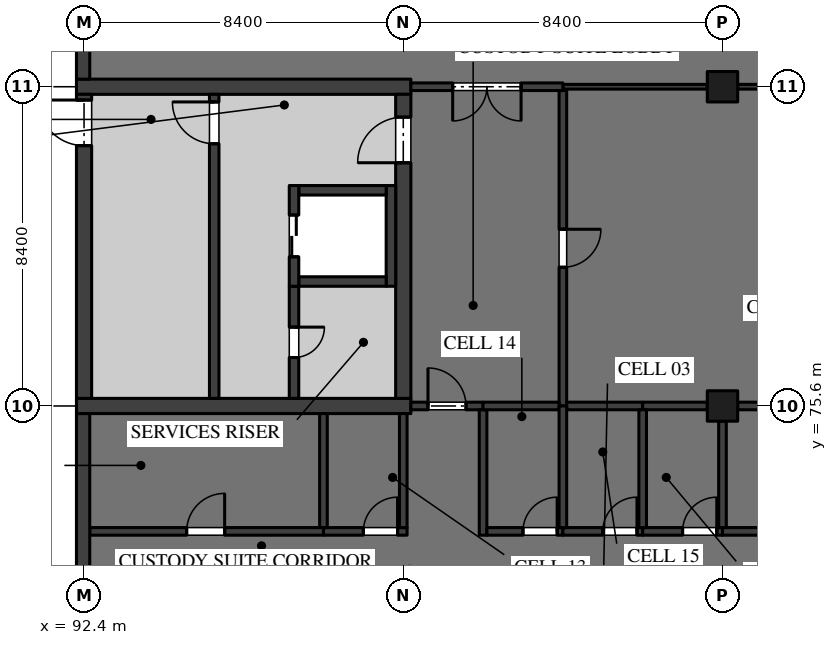
"""IFC4 building model, lengths in metres.
Left out: names, types, materials, properties, quantities, classifications, styles, units other than length and angle.
Written with IfcOpenShell. Run it as: python <this file> out.ifc"""

import sys

from ifc_helpers import new_model, si_unit, direction, frame, frame_2d, origin, origin_2d, place, context, subcontext, project, spatial, rectangle, extrude, element, fill, save


model = new_model("IFC4")
c1 = context("Model", 3, precision=1e-05, world=origin(), true_north=direction((0.0, 1.0)))
c2 = subcontext(c1, "Body", "Model", "MODEL_VIEW")
j1 = project(units=[si_unit("LENGTHUNIT", "METRE"), si_unit("PLANEANGLEUNIT", "RADIAN")], contexts=[c1])
p1 = place(None, origin())
s1 = spatial("IfcSite", under=j1, at=p1, CompositionType="ELEMENT")
p2 = place(p1, origin())
s2 = spatial("IfcBuilding", under=s1, at=p2, CompositionType="ELEMENT")
p3 = place(p2, origin())
s3 = spatial("IfcBuildingStorey", under=s2, at=p3, CompositionType="ELEMENT", Elevation=0.0)
for number, where, z_axis, x_axis in (
    (1, (109.2, 75.6, 0.0), (0.0, 0.0, 1.0), (1.0, 0.0, 0.0)),
    (2, (109.2, 84.0, 0.0), (0.0, 0.0, 1.0), (1.0, 0.0, 0.0)),
):
    element("IfcColumn", number, at=place(p3, frame(where, z_axis=z_axis, x_axis=x_axis)), inside=s3, PredefinedType="COLUMN", context=c2, shape_type="SweptSolid", body=[
        extrude(rectangle(XDim=0.8, YDim=0.8, at=origin_2d()), origin(), (0.0, 0.0, 1.0), 5.05),
    ])
for number, where, z_axis, x_axis in (
    (3, (92.2, 75.6, 0.0), (0.0, 0.0, 1.0), (1.0, 0.0, 0.0)),
    (4, (92.2, 84.0, 0.0), (0.0, 0.0, 1.0), (1.0, 0.0, 0.0)),
):
    element("IfcWall", number, at=place(p3, frame(where, z_axis=z_axis, x_axis=x_axis)), inside=s3, PredefinedType="SHEAR", context=c2, shape_type="SweptSolid", body=[
        extrude(rectangle(XDim=8.8, YDim=0.4, at=frame_2d((4.4, 0.0))), origin(), (0.0, 0.0, 1.0), 5.05),
    ])
p4 = place(p3, frame((92.4, 75.8, 0.0), z_axis=(0.0, 0.0, 1.0), x_axis=(0.0, 1.0, 0.0)))
e5 = element("IfcWall", 5, at=p4, inside=s3, PredefinedType="SHEAR", context=c2, shape_type="SweptSolid", body=[
    extrude(rectangle(XDim=8.0, YDim=0.4, at=frame_2d((4.0, 0.0))), origin(), (0.0, 0.0, 1.0), 5.05),
])
p5 = place(p4, frame((6.65, 0.0, 0.0)))
e6 = element("IfcOpeningElement", 6, at=p5, cuts=e5, PredefinedType="OPENING", context=c2, shape_type="SweptSolid", body=[
    extrude(rectangle(XDim=1.2, YDim=2.1, at=frame_2d((0.6, 1.05))), frame((0.0, 0.21, 0.0), z_axis=(0.0, -1.0, 0.0), x_axis=(1.0, 0.0, 0.0)), (0.0, 0.0, 1.0), 0.42),
])
p6 = place(p3, frame((100.8, 75.8, 0.0), z_axis=(0.0, 0.0, 1.0), x_axis=(0.0, 1.0, 0.0)))
e7 = element("IfcWall", 7, at=p6, inside=s3, PredefinedType="SHEAR", context=c2, shape_type="SweptSolid", body=[
    extrude(rectangle(XDim=8.0, YDim=0.4, at=frame_2d((4.0, 0.0))), origin(), (0.0, 0.0, 1.0), 5.05),
])
p7 = place(p6, frame((6.2, 0.0, 0.0)))
e8 = element("IfcOpeningElement", 8, at=p7, cuts=e7, PredefinedType="OPENING", context=c2, shape_type="SweptSolid", body=[
    extrude(rectangle(XDim=1.2, YDim=2.1, at=frame_2d((0.6, 1.05))), frame((0.0, 0.21, 0.0), z_axis=(0.0, -1.0, 0.0), x_axis=(1.0, 0.0, 0.0)), (0.0, 0.0, 1.0), 0.42),
])
p8 = place(p3, frame((95.825, 83.8, 0.0), z_axis=(0.0, 0.0, 1.0), x_axis=(0.0, -1.0, 0.0)))
e9 = element("IfcWall", 9, at=p8, inside=s3, PredefinedType="SOLIDWALL", context=c2, shape_type="SweptSolid", body=[
    extrude(rectangle(XDim=8.0, YDim=0.25, at=frame_2d((4.0, 0.0))), origin(), (0.0, 0.0, 1.0), 5.05),
])
p9 = place(p8, frame((0.2, 0.0, 0.0)))
e10 = element("IfcOpeningElement", 10, at=p9, cuts=e9, PredefinedType="OPENING", context=c2, shape_type="SweptSolid", body=[
    extrude(rectangle(XDim=1.1, YDim=2.1, at=frame_2d((0.55, 1.05))), frame((0.0, 0.135, 0.0), z_axis=(0.0, -1.0, 0.0), x_axis=(1.0, 0.0, 0.0)), (0.0, 0.0, 1.0), 0.27),
])
p10 = place(p3, frame((97.925, 78.75, 0.0), z_axis=(0.0, 0.0, 1.0), x_axis=(0.0, -1.0, 0.0)))
e11 = element("IfcWall", 11, at=p10, inside=s3, PredefinedType="SOLIDWALL", context=c2, shape_type="SweptSolid", body=[
    extrude(rectangle(XDim=2.95, YDim=0.25, at=frame_2d((1.475, 0.0))), origin(), (0.0, 0.0, 1.0), 5.05),
])
p11 = place(p10, frame((1.075, 0.0, 0.0)))
e12 = element("IfcOpeningElement", 12, at=p11, cuts=e11, PredefinedType="OPENING", context=c2, shape_type="SweptSolid", body=[
    extrude(rectangle(XDim=0.8, YDim=2.1, at=frame_2d((0.4, 1.05))), frame((0.0, 0.135, 0.0), z_axis=(0.0, -1.0, 0.0), x_axis=(1.0, 0.0, 0.0)), (0.0, 0.0, 1.0), 0.27),
])
p12 = place(p3, frame((100.475, 78.75, 0.0), z_axis=(0.0, 0.0, 1.0), x_axis=(0.0, 1.0, 0.0)))
e13 = element("IfcWall", 13, at=p12, inside=s3, PredefinedType="SOLIDWALL", context=c2, shape_type="SweptSolid", body=[
    extrude(rectangle(XDim=2.65, YDim=0.25, at=frame_2d((1.325, 0.0))), origin(), (0.0, 0.0, 1.0), 5.05),
])
for number, where, z_axis, x_axis in (
    (14, (98.05, 81.275, 0.0), (0.0, 0.0, 1.0), (1.0, 0.0, 0.0)),
    (15, (98.05, 78.875, 0.0), (0.0, 0.0, 1.0), (1.0, 0.0, 0.0)),
):
    element("IfcWall", number, at=place(p3, frame(where, z_axis=z_axis, x_axis=x_axis)), inside=s3, PredefinedType="SOLIDWALL", context=c2, shape_type="SweptSolid", body=[
        extrude(rectangle(XDim=2.3, YDim=0.25, at=frame_2d((1.15, 0.0))), origin(), (0.0, 0.0, 1.0), 5.05),
    ])
p13 = place(p3, frame((97.925, 78.75, 0.0), z_axis=(0.0, 0.0, 1.0), x_axis=(0.0, 1.0, 0.0)))
e16 = element("IfcWall", 16, at=p13, inside=s3, PredefinedType="SOLIDWALL", context=c2, shape_type="SweptSolid", body=[
    extrude(rectangle(XDim=2.65, YDim=0.25, at=frame_2d((1.325, 0.0))), origin(), (0.0, 0.0, 1.0), 5.05),
])
p14 = place(p13, frame((0.775, 0.0, 0.0)))
e17 = element("IfcOpeningElement", 17, at=p14, cuts=e16, PredefinedType="OPENING", context=c2, shape_type="SweptSolid", body=[
    extrude(rectangle(XDim=1.1, YDim=2.1, at=frame_2d((0.55, 1.05))), frame((0.0, 0.135, 0.0), z_axis=(0.0, -1.0, 0.0), x_axis=(1.0, 0.0, 0.0)), (0.0, 0.0, 1.0), 0.27),
])
p15 = place(p3, frame((105.0, 75.6, 0.0), z_axis=(0.0, 0.0, 1.0), x_axis=(0.0, 1.0, 0.0)))
e18 = element("IfcWall", 18, at=p15, inside=s3, PredefinedType="PARTITIONING", context=c2, shape_type="SweptSolid", body=[
    extrude(rectangle(XDim=8.3, YDim=0.2, at=frame_2d((4.15, 0.0))), origin(), (0.0, 0.0, 1.0), 5.05),
])
p16 = place(p15, frame((3.65, 0.0, 0.0)))
e19 = element("IfcOpeningElement", 19, at=p16, cuts=e18, PredefinedType="OPENING", context=c2, shape_type="SweptSolid", body=[
    extrude(rectangle(XDim=1.0, YDim=2.4, at=frame_2d((0.5, 1.2))), frame((0.0, 0.11, 0.0), z_axis=(0.0, -1.0, 0.0), x_axis=(1.0, 0.0, 0.0)), (0.0, 0.0, 1.0), 0.22),
])
p17 = place(p3, frame((105.1, 75.6, 0.0), z_axis=(0.0, 0.0, 1.0), x_axis=(1.0, 0.0, 0.0)))
e20 = element("IfcWall", 20, at=p17, inside=s3, PredefinedType="PARTITIONING", context=c2, shape_type="SweptSolid", body=[
    extrude(rectangle(XDim=2.0, YDim=0.2, at=frame_2d((1.0, 0.0))), origin(), (0.0, 0.0, 1.0), 5.05),
])
for number, where, z_axis, x_axis in (
    (21, (107.1, 75.6, 0.0), (0.0, 0.0, 1.0), (1.0, 0.0, 0.0)),
    (22, (109.6, 75.6, 0.0), (0.0, 0.0, 1.0), (1.0, 0.0, 0.0)),
):
    element("IfcWall", number, at=place(p3, frame(where, z_axis=z_axis, x_axis=x_axis)), inside=s3, PredefinedType="PARTITIONING", context=c2, shape_type="SweptSolid", body=[
        extrude(rectangle(XDim=1.7, YDim=0.2, at=frame_2d((0.85, 0.0))), origin(), (0.0, 0.0, 1.0), 5.05),
    ])
p18 = place(p3, frame((105.0, 84.0, 0.0), z_axis=(0.0, 0.0, 1.0), x_axis=(1.0, 0.0, 0.0)))
e23 = element("IfcWall", 23, at=p18, inside=s3, PredefinedType="PARTITIONING", context=c2, shape_type="SweptSolid", body=[
    extrude(rectangle(XDim=3.8, YDim=0.125, at=frame_2d((1.9, 0.0))), origin(), (0.0, 0.0, 1.0), 5.05),
])
p19 = place(p3, frame((109.6, 84.0, 0.0), z_axis=(0.0, 0.0, 1.0), x_axis=(1.0, 0.0, 0.0)))
e24 = element("IfcWall", 24, at=p19, inside=s3, PredefinedType="PARTITIONING", context=c2, shape_type="SweptSolid", body=[
    extrude(rectangle(XDim=7.6, YDim=0.125, at=frame_2d((3.8, 0.0))), origin(), (0.0, 0.0, 1.0), 5.05),
])
p20 = place(p3, frame((101.0, 75.6, 0.0), z_axis=(0.0, 0.0, 1.0), x_axis=(1.0, 0.0, 0.0)))
e25 = element("IfcWall", 25, at=p20, inside=s3, PredefinedType="PARTITIONING", context=c2, shape_type="SweptSolid", body=[
    extrude(rectangle(XDim=1.9, YDim=0.2, at=frame_2d((0.95, 0.0))), origin(), (0.0, 0.0, 1.0), 5.05),
])
p21 = place(p20, frame((0.45, 0.0, 0.0)))
e26 = element("IfcOpeningElement", 26, at=p21, cuts=e25, PredefinedType="OPENING", context=c2, shape_type="SweptSolid", body=[
    extrude(rectangle(XDim=1.0, YDim=2.4, at=frame_2d((0.5, 1.2))), frame((0.0, 0.11, 0.0), z_axis=(0.0, -1.0, 0.0), x_axis=(1.0, 0.0, 0.0)), (0.0, 0.0, 1.0), 0.22),
])
p22 = place(p3, frame((98.7, 72.3, 0.0), z_axis=(0.0, 0.0, 1.0), x_axis=(1.0, 0.0, 0.0)))
e27 = element("IfcWall", 27, at=p22, inside=s3, PredefinedType="PARTITIONING", context=c2, shape_type="SweptSolid", body=[
    extrude(rectangle(XDim=2.2, YDim=0.2, at=frame_2d((1.1, 0.0))), origin(), (0.0, 0.0, 1.0), 5.05),
])
p23 = place(p22, frame((1.05, 0.0, 0.0)))
e28 = element("IfcOpeningElement", 28, at=p23, cuts=e27, PredefinedType="OPENING", context=c2, shape_type="SweptSolid", body=[
    extrude(rectangle(XDim=0.9, YDim=2.1, at=frame_2d((0.45, 1.05))), frame((0.0, 0.11, 0.0), z_axis=(0.0, -1.0, 0.0), x_axis=(1.0, 0.0, 0.0)), (0.0, 0.0, 1.0), 0.22),
])
p24 = place(p3, frame((100.8, 72.4, 0.0), z_axis=(0.0, 0.0, 1.0), x_axis=(0.0, 1.0, 0.0)))
e29 = element("IfcWall", 29, at=p24, inside=s3, PredefinedType="PARTITIONING", context=c2, shape_type="SweptSolid", body=[
    extrude(rectangle(XDim=3.0, YDim=0.2, at=frame_2d((1.5, 0.0))), origin(), (0.0, 0.0, 1.0), 5.05),
])
p25 = place(p3, frame((102.9, 72.2, 0.0), z_axis=(0.0, 0.0, 1.0), x_axis=(0.0, 1.0, 0.0)))
e30 = element("IfcWall", 30, at=p25, inside=s3, PredefinedType="PARTITIONING", context=c2, shape_type="SweptSolid", body=[
    extrude(rectangle(XDim=3.3, YDim=0.2, at=frame_2d((1.65, 0.0))), origin(), (0.0, 0.0, 1.0), 5.05),
])
p26 = place(p3, frame((103.0, 72.3, 0.0), z_axis=(0.0, 0.0, 1.0), x_axis=(1.0, 0.0, 0.0)))
e31 = element("IfcWall", 31, at=p26, inside=s3, PredefinedType="PARTITIONING", context=c2, shape_type="SweptSolid", body=[
    extrude(rectangle(XDim=2.0, YDim=0.2, at=frame_2d((1.0, 0.0))), origin(), (0.0, 0.0, 1.0), 5.05),
])
p27 = place(p26, frame((0.95, 0.0, 0.0)))
e32 = element("IfcOpeningElement", 32, at=p27, cuts=e31, PredefinedType="OPENING", context=c2, shape_type="SweptSolid", body=[
    extrude(rectangle(XDim=0.9, YDim=2.1, at=frame_2d((0.45, 1.05))), frame((0.0, 0.11, 0.0), z_axis=(0.0, -1.0, 0.0), x_axis=(1.0, 0.0, 0.0)), (0.0, 0.0, 1.0), 0.22),
])
p28 = place(p3, frame((105.0, 72.3, 0.0), z_axis=(0.0, 0.0, 1.0), x_axis=(1.0, 0.0, 0.0)))
e33 = element("IfcWall", 33, at=p28, inside=s3, PredefinedType="PARTITIONING", context=c2, shape_type="SweptSolid", body=[
    extrude(rectangle(XDim=2.1, YDim=0.2, at=frame_2d((1.05, 0.0))), origin(), (0.0, 0.0, 1.0), 5.05),
])
p29 = place(p28, frame((1.05, 0.0, 0.0)))
e34 = element("IfcOpeningElement", 34, at=p29, cuts=e33, PredefinedType="OPENING", context=c2, shape_type="SweptSolid", body=[
    extrude(rectangle(XDim=0.9, YDim=2.1, at=frame_2d((0.45, 1.05))), frame((0.0, 0.11, 0.0), z_axis=(0.0, -1.0, 0.0), x_axis=(1.0, 0.0, 0.0)), (0.0, 0.0, 1.0), 0.22),
])
p30 = place(p3, frame((107.1, 72.3, 0.0), z_axis=(0.0, 0.0, 1.0), x_axis=(1.0, 0.0, 0.0)))
e35 = element("IfcWall", 35, at=p30, inside=s3, PredefinedType="PARTITIONING", context=c2, shape_type="SweptSolid", body=[
    extrude(rectangle(XDim=2.1, YDim=0.2, at=frame_2d((1.05, 0.0))), origin(), (0.0, 0.0, 1.0), 5.05),
])
p31 = place(p30, frame((1.05, 0.0, 0.0)))
e36 = element("IfcOpeningElement", 36, at=p31, cuts=e35, PredefinedType="OPENING", context=c2, shape_type="SweptSolid", body=[
    extrude(rectangle(XDim=0.9, YDim=2.1, at=frame_2d((0.45, 1.05))), frame((0.0, 0.11, 0.0), z_axis=(0.0, -1.0, 0.0), x_axis=(1.0, 0.0, 0.0)), (0.0, 0.0, 1.0), 0.22),
])
p32 = place(p3, frame((109.2, 72.3, 0.0), z_axis=(0.0, 0.0, 1.0), x_axis=(1.0, 0.0, 0.0)))
e37 = element("IfcWall", 37, at=p32, inside=s3, PredefinedType="PARTITIONING", context=c2, shape_type="SweptSolid", body=[
    extrude(rectangle(XDim=2.1, YDim=0.2, at=frame_2d((1.05, 0.0))), origin(), (0.0, 0.0, 1.0), 5.05),
])
p33 = place(p32, frame((1.05, 0.0, 0.0)))
e38 = element("IfcOpeningElement", 38, at=p33, cuts=e37, PredefinedType="OPENING", context=c2, shape_type="SweptSolid", body=[
    extrude(rectangle(XDim=0.9, YDim=2.1, at=frame_2d((0.45, 1.05))), frame((0.0, 0.11, 0.0), z_axis=(0.0, -1.0, 0.0), x_axis=(1.0, 0.0, 0.0)), (0.0, 0.0, 1.0), 0.22),
])
p34 = place(p3, frame((92.55, 72.3, 0.0), z_axis=(0.0, 0.0, 1.0), x_axis=(1.0, 0.0, 0.0)))
e39 = element("IfcWall", 39, at=p34, inside=s3, PredefinedType="PARTITIONING", context=c2, shape_type="SweptSolid", body=[
    extrude(rectangle(XDim=6.15, YDim=0.2, at=frame_2d((3.075, 0.0))), origin(), (0.0, 0.0, 1.0), 5.05),
])
p35 = place(p34, frame((2.55, 0.0, 0.0)))
e40 = element("IfcOpeningElement", 40, at=p35, cuts=e39, PredefinedType="OPENING", context=c2, shape_type="SweptSolid", body=[
    extrude(rectangle(XDim=1.0, YDim=2.1, at=frame_2d((0.5, 1.05))), frame((0.0, 0.11, 0.0), z_axis=(0.0, -1.0, 0.0), x_axis=(1.0, 0.0, 0.0)), (0.0, 0.0, 1.0), 0.22),
])
p36 = place(p3, frame((102.9, 75.6, 0.0), z_axis=(0.0, 0.0, 1.0), x_axis=(1.0, 0.0, 0.0)))
e41 = element("IfcWall", 41, at=p36, inside=s3, PredefinedType="PARTITIONING", context=c2, shape_type="SweptSolid", body=[
    extrude(rectangle(XDim=2.0, YDim=0.2, at=frame_2d((1.0, 0.0))), origin(), (0.0, 0.0, 1.0), 5.05),
])
p37 = place(p3, frame((101.0, 84.0, 0.0), z_axis=(0.0, 0.0, 1.0), x_axis=(1.0, 0.0, 0.0)))
e42 = element("IfcWall", 42, at=p37, inside=s3, PredefinedType="PARTITIONING", context=c2, shape_type="SweptSolid", body=[
    extrude(rectangle(XDim=4.0, YDim=0.2, at=frame_2d((2.0, 0.0))), origin(), (0.0, 0.0, 1.0), 5.05),
])
p38 = place(p37, frame((1.1, 0.0, 0.0)))
e43 = element("IfcOpeningElement", 43, at=p38, cuts=e42, PredefinedType="OPENING", context=c2, shape_type="SweptSolid", body=[
    extrude(rectangle(XDim=1.8, YDim=2.1, at=frame_2d((0.9, 1.05))), frame((0.0, 0.11, 0.0), z_axis=(0.0, -1.0, 0.0), x_axis=(1.0, 0.0, 0.0)), (0.0, 0.0, 1.0), 0.22),
])
p39 = place(p3, frame((98.7, 72.4, 0.0), z_axis=(0.0, 0.0, 1.0), x_axis=(0.0, 1.0, 0.0)))
e44 = element("IfcWall", 44, at=p39, inside=s3, PredefinedType="PARTITIONING", context=c2, shape_type="SweptSolid", body=[
    extrude(rectangle(XDim=3.0, YDim=0.2, at=frame_2d((1.5, 0.0))), origin(), (0.0, 0.0, 1.0), 5.05),
])
p40 = place(p3, frame((105.0, 72.4, 0.0), z_axis=(0.0, 0.0, 1.0), x_axis=(0.0, 1.0, 0.0)))
e45 = element("IfcWall", 45, at=p40, inside=s3, PredefinedType="PARTITIONING", context=c2, shape_type="SweptSolid", body=[
    extrude(rectangle(XDim=3.2, YDim=0.2, at=frame_2d((1.6, 0.0))), origin(), (0.0, 0.0, 1.0), 5.05),
])
p41 = place(p3, frame((107.1, 72.4, 0.0), z_axis=(0.0, 0.0, 1.0), x_axis=(0.0, 1.0, 0.0)))
e46 = element("IfcWall", 46, at=p41, inside=s3, PredefinedType="PARTITIONING", context=c2, shape_type="SweptSolid", body=[
    extrude(rectangle(XDim=3.1, YDim=0.2, at=frame_2d((1.55, 0.0))), origin(), (0.0, 0.0, 1.0), 5.05),
])
p42 = place(p3, frame((109.2, 72.4, 0.0), z_axis=(0.0, 0.0, 1.0), x_axis=(0.0, 1.0, 0.0)))
e47 = element("IfcWall", 47, at=p42, inside=s3, PredefinedType="PARTITIONING", context=c2, shape_type="SweptSolid", body=[
    extrude(rectangle(XDim=2.8, YDim=0.2, at=frame_2d((1.4, 0.0))), origin(), (0.0, 0.0, 1.0), 5.05),
])
p43 = place(p3, frame((92.375, 92.02, 0.0), z_axis=(0.0, 0.0, 1.0), x_axis=(0.0, -1.0, 0.0)))
e48 = element("IfcWall", 48, at=p43, inside=s3, PredefinedType="SOLIDWALL", context=c2, shape_type="SweptSolid", body=[
    extrude(rectangle(XDim=7.82, YDim=0.35, at=frame_2d((3.91, 0.0))), origin(), (0.0, 0.0, 1.0), 5.05),
])
p44 = place(p3, frame((92.375, 75.4, 0.0), z_axis=(0.0, 0.0, 1.0), x_axis=(0.0, -1.0, 0.0)))
e49 = element("IfcWall", 49, at=p44, inside=s3, PredefinedType="SOLIDWALL", context=c2, shape_type="SweptSolid", body=[
    extrude(rectangle(XDim=8.0, YDim=0.35, at=frame_2d((4.0, 0.0))), origin(), (0.0, 0.0, 1.0), 5.05),
])
p45 = place(p44, frame((6.7, 0.0, 1.5)))
e50 = element("IfcOpeningElement", 50, at=p45, cuts=e49, PredefinedType="OPENING", context=c2, shape_type="SweptSolid", body=[
    extrude(rectangle(XDim=0.9, YDim=1.2, at=frame_2d((0.45, 0.6))), frame((0.0, 0.185, 0.0), z_axis=(0.0, -1.0, 0.0), x_axis=(1.0, 0.0, 0.0)), (0.0, 0.0, 1.0), 0.37),
])
p46 = place(p7, origin())
e51 = element("IfcDoor", 51, at=p46, inside=s3, OperationType="SINGLE_SWING_RIGHT", PredefinedType="DOOR", context=c2, shape_type="SweptSolid", body=[
    extrude(rectangle(XDim=1.2, YDim=2.1, at=frame_2d((0.6, 1.05))), frame((0.0, 0.035, 0.0), z_axis=(0.0, -1.0, 0.0), x_axis=(1.0, 0.0, 0.0)), (0.0, 0.0, 1.0), 0.07),
])
fill(e8, e51)
p47 = place(p11, origin())
e52 = element("IfcDoor", 52, at=p47, inside=s3, OperationType="SINGLE_SWING_RIGHT", PredefinedType="DOOR", context=c2, shape_type="SweptSolid", body=[
    extrude(rectangle(XDim=0.8, YDim=2.1, at=frame_2d((0.4, 1.05))), frame((0.0, 0.035, 0.0), z_axis=(0.0, -1.0, 0.0), x_axis=(1.0, 0.0, 0.0)), (0.0, 0.0, 1.0), 0.07),
])
fill(e12, e52)
p48 = place(p9, frame((1.1, 0.0, 0.0), z_axis=(0.0, 0.0, 1.0), x_axis=(-1.0, 0.0, 0.0)))
e53 = element("IfcDoor", 53, at=p48, inside=s3, OperationType="SINGLE_SWING_LEFT", PredefinedType="DOOR", context=c2, shape_type="SweptSolid", body=[
    extrude(rectangle(XDim=1.1, YDim=2.1, at=frame_2d((0.55, 1.05))), frame((0.0, 0.035, 0.0), z_axis=(0.0, -1.0, 0.0), x_axis=(1.0, 0.0, 0.0)), (0.0, 0.0, 1.0), 0.07),
])
fill(e10, e53)
p49 = place(p5, origin())
e54 = element("IfcDoor", 54, at=p49, inside=s3, OperationType="SINGLE_SWING_LEFT", PredefinedType="DOOR", context=c2, shape_type="SweptSolid", body=[
    extrude(rectangle(XDim=1.2, YDim=2.1, at=frame_2d((0.6, 1.05))), frame((0.0, 0.035, 0.0), z_axis=(0.0, -1.0, 0.0), x_axis=(1.0, 0.0, 0.0)), (0.0, 0.0, 1.0), 0.07),
])
fill(e6, e54)
p50 = place(p14, origin())
e55 = element("IfcDoor", 55, at=p50, inside=s3, OperationType="DOUBLE_DOOR_SLIDING", PredefinedType="DOOR", context=c2, shape_type="SweptSolid", body=[
    extrude(rectangle(XDim=1.1, YDim=2.1, at=frame_2d((0.55, 1.05))), frame((0.0, 0.04, 0.0), z_axis=(0.0, -1.0, 0.0), x_axis=(1.0, 0.0, 0.0)), (0.0, 0.0, 1.0), 0.08),
])
fill(e17, e55)
p51 = place(p16, frame((1.0, 0.0, 0.0), z_axis=(0.0, 0.0, 1.0), x_axis=(-1.0, 0.0, 0.0)))
e56 = element("IfcDoor", 56, at=p51, inside=s3, OperationType="SINGLE_SWING_RIGHT", PredefinedType="DOOR", context=c2, shape_type="SweptSolid", body=[
    extrude(rectangle(XDim=1.0, YDim=2.4, at=frame_2d((0.5, 1.2))), frame((0.0, 0.035, 0.0), z_axis=(0.0, -1.0, 0.0), x_axis=(1.0, 0.0, 0.0)), (0.0, 0.0, 1.0), 0.07),
])
fill(e19, e56)
p52 = place(p21, origin())
e57 = element("IfcDoor", 57, at=p52, inside=s3, OperationType="SINGLE_SWING_RIGHT", PredefinedType="DOOR", context=c2, shape_type="SweptSolid", body=[
    extrude(rectangle(XDim=1.0, YDim=2.4, at=frame_2d((0.5, 1.2))), frame((0.0, 0.03, 0.0), z_axis=(0.0, -1.0, 0.0), x_axis=(1.0, 0.0, 0.0)), (0.0, 0.0, 1.0), 0.06),
])
fill(e26, e57)
p53 = place(p23, origin())
e58 = element("IfcDoor", 58, at=p53, inside=s3, OperationType="SINGLE_SWING_LEFT", PredefinedType="DOOR", context=c2, shape_type="SweptSolid", body=[
    extrude(rectangle(XDim=0.9, YDim=2.1, at=frame_2d((0.45, 1.05))), frame((0.0, 0.04, 0.0), z_axis=(0.0, -1.0, 0.0), x_axis=(1.0, 0.0, 0.0)), (0.0, 0.0, 1.0), 0.08),
])
fill(e28, e58)
p54 = place(p27, origin())
e59 = element("IfcDoor", 59, at=p54, inside=s3, OperationType="SINGLE_SWING_LEFT", PredefinedType="DOOR", context=c2, shape_type="SweptSolid", body=[
    extrude(rectangle(XDim=0.9, YDim=2.1, at=frame_2d((0.45, 1.05))), frame((0.0, 0.04, 0.0), z_axis=(0.0, -1.0, 0.0), x_axis=(1.0, 0.0, 0.0)), (0.0, 0.0, 1.0), 0.08),
])
fill(e32, e59)
p55 = place(p29, origin())
e60 = element("IfcDoor", 60, at=p55, inside=s3, OperationType="SINGLE_SWING_LEFT", PredefinedType="DOOR", context=c2, shape_type="SweptSolid", body=[
    extrude(rectangle(XDim=0.9, YDim=2.1, at=frame_2d((0.45, 1.05))), frame((0.0, 0.04, 0.0), z_axis=(0.0, -1.0, 0.0), x_axis=(1.0, 0.0, 0.0)), (0.0, 0.0, 1.0), 0.08),
])
fill(e34, e60)
p56 = place(p31, origin())
e61 = element("IfcDoor", 61, at=p56, inside=s3, OperationType="SINGLE_SWING_LEFT", PredefinedType="DOOR", context=c2, shape_type="SweptSolid", body=[
    extrude(rectangle(XDim=0.9, YDim=2.1, at=frame_2d((0.45, 1.05))), frame((0.0, 0.04, 0.0), z_axis=(0.0, -1.0, 0.0), x_axis=(1.0, 0.0, 0.0)), (0.0, 0.0, 1.0), 0.08),
])
fill(e36, e61)
p57 = place(p38, frame((1.8, 0.0, 0.0), z_axis=(0.0, 0.0, 1.0), x_axis=(-1.0, 0.0, 0.0)))
e62 = element("IfcDoor", 62, at=p57, inside=s3, OperationType="DOUBLE_DOOR_SINGLE_SWING", PredefinedType="DOOR", context=c2, shape_type="SweptSolid", body=[
    extrude(rectangle(XDim=1.8, YDim=2.1, at=frame_2d((0.9, 1.05))), frame((0.0, 0.03, 0.0), z_axis=(0.0, -1.0, 0.0), x_axis=(1.0, 0.0, 0.0)), (0.0, 0.0, 1.0), 0.06),
])
fill(e43, e62)
p58 = place(p35, origin())
e63 = element("IfcDoor", 63, at=p58, inside=s3, OperationType="SINGLE_SWING_LEFT", PredefinedType="DOOR", context=c2, shape_type="SweptSolid", body=[
    extrude(rectangle(XDim=1.0, YDim=2.1, at=frame_2d((0.5, 1.05))), frame((0.0, 0.045, 0.0), z_axis=(0.0, -1.0, 0.0), x_axis=(1.0, 0.0, 0.0)), (0.0, 0.0, 1.0), 0.09),
])
fill(e40, e63)
save(model, sys.argv[1])
